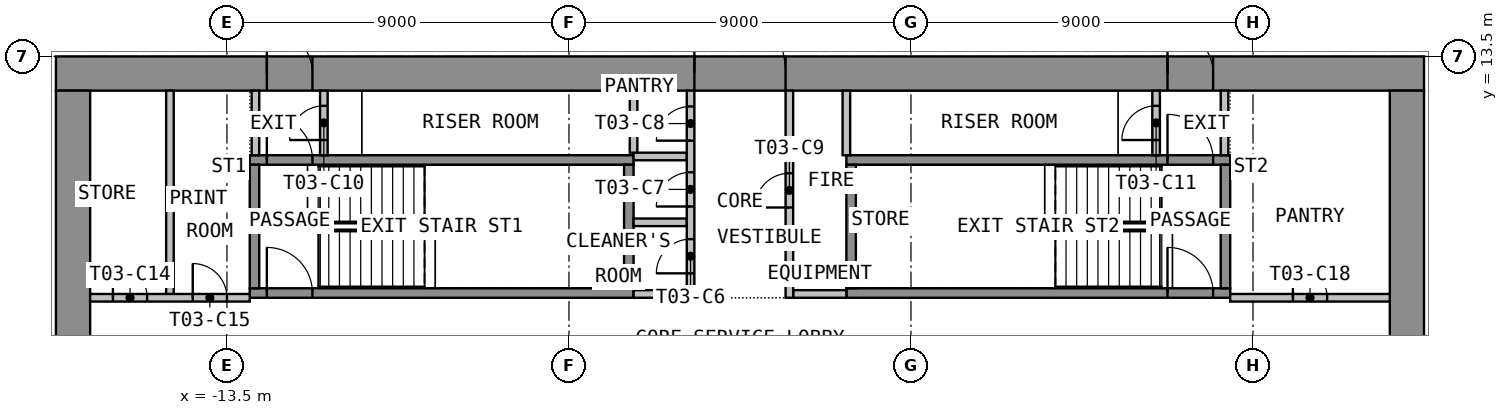
"""IFC4 building model, lengths in metres.
Left out: names, types, materials, properties, quantities, classifications, styles, units other than length and angle.
Written with IfcOpenShell. Run it as: python <this file> out.ifc"""

import sys

from ifc_helpers import new_model, si_unit, direction, frame, frame_2d, origin, place, context, subcontext, project, spatial, rectangle, extrude, element, fill, save


model = new_model("IFC4")
c1 = context("Model", 3, precision=1e-05, world=origin(), true_north=direction((0.0, 1.0)))
c2 = subcontext(c1, "Body", "Model", "MODEL_VIEW")
j1 = project(units=[si_unit("LENGTHUNIT", "METRE"), si_unit("PLANEANGLEUNIT", "RADIAN")], contexts=[c1])
p1 = place(None, origin())
s1 = spatial("IfcSite", under=j1, at=p1, CompositionType="ELEMENT")
p2 = place(p1, origin())
s2 = spatial("IfcBuilding", under=s1, at=p2, CompositionType="ELEMENT")
p3 = place(p2, frame((0.0, 0.0, 53.4)))
s3 = spatial("IfcBuildingStorey", under=s2, at=p3, CompositionType="ELEMENT", Elevation=53.4)
p4 = place(p3, frame((-18.0, 13.05, 0.0), z_axis=(0.0, 0.0, 1.0), x_axis=(1.0, 0.0, 0.0)))
e1 = element("IfcWall", 1, at=p4, inside=s3, PredefinedType="SHEAR", context=c2, shape_type="SweptSolid", body=[
    extrude(rectangle(XDim=36.0, YDim=0.9, at=frame_2d((18.0, 0.0))), origin(), (0.0, 0.0, 1.0), 3.525),
])
p5 = place(p4, frame((16.8, 0.0, 0.0)))
e2 = element("IfcOpeningElement", 2, at=p5, cuts=e1, PredefinedType="OPENING", context=c2, shape_type="SweptSolid", body=[
    extrude(rectangle(XDim=2.4, YDim=2.1, at=frame_2d((1.2, 1.05))), frame((0.0, 0.46, 0.0), z_axis=(0.0, -1.0, 0.0), x_axis=(1.0, 0.0, 0.0)), (0.0, 0.0, 1.0), 0.92),
])
p6 = place(p4, frame((5.55, 0.0, 0.0)))
e3 = element("IfcOpeningElement", 3, at=p6, cuts=e1, PredefinedType="OPENING", context=c2, shape_type="SweptSolid", body=[
    extrude(rectangle(XDim=1.2, YDim=2.1, at=frame_2d((0.6, 1.05))), frame((0.0, 0.46, 0.0), z_axis=(0.0, -1.0, 0.0), x_axis=(1.0, 0.0, 0.0)), (0.0, 0.0, 1.0), 0.92),
])
p7 = place(p4, frame((29.25, 0.0, 0.0)))
e4 = element("IfcOpeningElement", 4, at=p7, cuts=e1, PredefinedType="OPENING", context=c2, shape_type="SweptSolid", body=[
    extrude(rectangle(XDim=1.2, YDim=2.1, at=frame_2d((0.6, 1.05))), frame((0.0, 0.46, 0.0), z_axis=(0.0, -1.0, 0.0), x_axis=(1.0, 0.0, 0.0)), (0.0, 0.0, 1.0), 0.92),
])
p8 = place(p3, frame((-17.55, -12.6, 0.0), z_axis=(0.0, 0.0, 1.0), x_axis=(0.0, 1.0, 0.0)))
e5 = element("IfcWall", 5, at=p8, inside=s3, PredefinedType="SHEAR", context=c2, shape_type="SweptSolid", body=[
    extrude(rectangle(XDim=25.2, YDim=0.9, at=frame_2d((12.6, 0.0))), origin(), (0.0, 0.0, 1.0), 3.525),
])
p9 = place(p8, frame((11.4, 0.0, 0.0)))
e6 = element("IfcOpeningElement", 6, at=p9, cuts=e5, PredefinedType="OPENING", context=c2, shape_type="SweptSolid", body=[
    extrude(rectangle(XDim=2.4, YDim=2.1, at=frame_2d((1.2, 1.05))), frame((0.0, 0.46, 0.0), z_axis=(0.0, -1.0, 0.0), x_axis=(1.0, 0.0, 0.0)), (0.0, 0.0, 1.0), 0.92),
])
p10 = place(p3, frame((17.55, -12.6, 0.0), z_axis=(0.0, 0.0, 1.0), x_axis=(0.0, 1.0, 0.0)))
e7 = element("IfcWall", 7, at=p10, inside=s3, PredefinedType="SHEAR", context=c2, shape_type="SweptSolid", body=[
    extrude(rectangle(XDim=25.2, YDim=0.9, at=frame_2d((12.6, 0.0))), origin(), (0.0, 0.0, 1.0), 3.525),
])
p11 = place(p10, frame((11.4, 0.0, 0.0)))
e8 = element("IfcOpeningElement", 8, at=p11, cuts=e7, PredefinedType="OPENING", context=c2, shape_type="SweptSolid", body=[
    extrude(rectangle(XDim=2.4, YDim=2.1, at=frame_2d((1.2, 1.05))), frame((0.0, 0.46, 0.0), z_axis=(0.0, -1.0, 0.0), x_axis=(1.0, 0.0, 0.0)), (0.0, 0.0, 1.0), 0.92),
])
p12 = place(p3, frame((-12.9, 7.275, 0.0), z_axis=(0.0, 0.0, 1.0), x_axis=(1.0, 0.0, 0.0)))
e9 = element("IfcWall", 9, at=p12, inside=s3, PredefinedType="SHEAR", context=c2, shape_type="SweptSolid", body=[
    extrude(rectangle(XDim=10.1, YDim=0.25, at=frame_2d((5.05, 0.0))), origin(), (0.0, 0.0, 1.0), 3.525),
])
p13 = place(p12, frame((0.45, 0.0, 0.0)))
e10 = element("IfcOpeningElement", 10, at=p13, cuts=e9, PredefinedType="OPENING", context=c2, shape_type="SweptSolid", body=[
    extrude(rectangle(XDim=1.2, YDim=2.1, at=frame_2d((0.6, 1.05))), frame((0.0, 0.135, 0.0), z_axis=(0.0, -1.0, 0.0), x_axis=(1.0, 0.0, 0.0)), (0.0, 0.0, 1.0), 0.27),
])
p14 = place(p3, frame((-12.9, 10.775, 0.0), z_axis=(0.0, 0.0, 1.0), x_axis=(1.0, 0.0, 0.0)))
e11 = element("IfcWall", 11, at=p14, inside=s3, PredefinedType="SHEAR", context=c2, shape_type="SweptSolid", body=[
    extrude(rectangle(XDim=10.1, YDim=0.25, at=frame_2d((5.05, 0.0))), origin(), (0.0, 0.0, 1.0), 3.525),
])
p15 = place(p14, frame((0.45, 0.0, 0.0)))
e12 = element("IfcOpeningElement", 12, at=p15, cuts=e11, PredefinedType="OPENING", context=c2, shape_type="SweptSolid", body=[
    extrude(rectangle(XDim=1.2, YDim=2.1, at=frame_2d((0.6, 1.05))), frame((0.0, 0.135, 0.0), z_axis=(0.0, -1.0, 0.0), x_axis=(1.0, 0.0, 0.0)), (0.0, 0.0, 1.0), 0.27),
])
for number, where, z_axis, x_axis in (
    (13, (-12.775, 7.4, 0.0), (0.0, 0.0, 1.0), (0.0, 1.0, 0.0)),
    (14, (-2.925, 7.4, 0.0), (0.0, 0.0, 1.0), (0.0, 1.0, 0.0)),
):
    element("IfcWall", number, at=place(p3, frame(where, z_axis=z_axis, x_axis=x_axis)), inside=s3, PredefinedType="SHEAR", context=c2, shape_type="SweptSolid", body=[
        extrude(rectangle(XDim=3.25, YDim=0.25, at=frame_2d((1.625, 0.0))), origin(), (0.0, 0.0, 1.0), 3.525),
    ])
p16 = place(p3, frame((2.8, 7.275, 0.0), z_axis=(0.0, 0.0, 1.0), x_axis=(1.0, 0.0, 0.0)))
e15 = element("IfcWall", 15, at=p16, inside=s3, PredefinedType="SHEAR", context=c2, shape_type="SweptSolid", body=[
    extrude(rectangle(XDim=10.1, YDim=0.25, at=frame_2d((5.05, 0.0))), origin(), (0.0, 0.0, 1.0), 3.525),
])
p17 = place(p16, frame((8.45, 0.0, 0.0)))
e16 = element("IfcOpeningElement", 16, at=p17, cuts=e15, PredefinedType="OPENING", context=c2, shape_type="SweptSolid", body=[
    extrude(rectangle(XDim=1.2, YDim=2.1, at=frame_2d((0.6, 1.05))), frame((0.0, 0.135, 0.0), z_axis=(0.0, -1.0, 0.0), x_axis=(1.0, 0.0, 0.0)), (0.0, 0.0, 1.0), 0.27),
])
p18 = place(p3, frame((2.8, 10.775, 0.0), z_axis=(0.0, 0.0, 1.0), x_axis=(1.0, 0.0, 0.0)))
e17 = element("IfcWall", 17, at=p18, inside=s3, PredefinedType="SHEAR", context=c2, shape_type="SweptSolid", body=[
    extrude(rectangle(XDim=10.1, YDim=0.25, at=frame_2d((5.05, 0.0))), origin(), (0.0, 0.0, 1.0), 3.525),
])
p19 = place(p18, frame((8.45, 0.0, 0.0)))
e18 = element("IfcOpeningElement", 18, at=p19, cuts=e17, PredefinedType="OPENING", context=c2, shape_type="SweptSolid", body=[
    extrude(rectangle(XDim=1.2, YDim=2.1, at=frame_2d((0.6, 1.05))), frame((0.0, 0.135, 0.0), z_axis=(0.0, -1.0, 0.0), x_axis=(1.0, 0.0, 0.0)), (0.0, 0.0, 1.0), 0.27),
])
for number, where, z_axis, x_axis in (
    (19, (2.925, 7.4, 0.0), (0.0, 0.0, 1.0), (0.0, 1.0, 0.0)),
    (20, (12.775, 7.4, 0.0), (0.0, 0.0, 1.0), (0.0, 1.0, 0.0)),
):
    element("IfcWall", number, at=place(p3, frame(where, z_axis=z_axis, x_axis=x_axis)), inside=s3, PredefinedType="SHEAR", context=c2, shape_type="SweptSolid", body=[
        extrude(rectangle(XDim=3.25, YDim=0.25, at=frame_2d((1.625, 0.0))), origin(), (0.0, 0.0, 1.0), 3.525),
    ])
for number, where, z_axis, x_axis in (
    (21, (-2.8, 7.25, 0.0), (0.0, 0.0, 1.0), (1.0, 0.0, 0.0)),
    (22, (-2.8, 9.135, 0.0), (0.0, 0.0, 1.0), (1.0, 0.0, 0.0)),
    (23, (-2.8, 10.867, 0.0), (0.0, 0.0, 1.0), (1.0, 0.0, 0.0)),
    (24, (1.4, 7.25, 0.0), (0.0, 0.0, 1.0), (1.0, 0.0, 0.0)),
):
    element("IfcWall", number, at=place(p3, frame(where, z_axis=z_axis, x_axis=x_axis)), inside=s3, PredefinedType="PARTITIONING", context=c2, shape_type="SweptSolid", body=[
        extrude(rectangle(XDim=1.4, YDim=0.2, at=frame_2d((0.7, 0.0))), origin(), (0.0, 0.0, 1.0), 3.525),
    ])
p20 = place(p3, frame((-1.3, 7.15, 0.0), z_axis=(0.0, 0.0, 1.0), x_axis=(0.0, 1.0, 0.0)))
e25 = element("IfcWall", 25, at=p20, inside=s3, PredefinedType="PARTITIONING", context=c2, shape_type="SweptSolid", body=[
    extrude(rectangle(XDim=5.45, YDim=0.2, at=frame_2d((2.725, 0.0))), origin(), (0.0, 0.0, 1.0), 3.525),
])
p21 = place(p20, frame((0.643, 0.0, 0.0)))
e26 = element("IfcOpeningElement", 26, at=p21, cuts=e25, PredefinedType="OPENING", context=c2, shape_type="SweptSolid", body=[
    extrude(rectangle(XDim=0.9, YDim=2.1, at=frame_2d((0.45, 1.05))), frame((0.0, 0.11, 0.0), z_axis=(0.0, -1.0, 0.0), x_axis=(1.0, 0.0, 0.0)), (0.0, 0.0, 1.0), 0.22),
])
p22 = place(p20, frame((2.401, 0.0, 0.0)))
e27 = element("IfcOpeningElement", 27, at=p22, cuts=e25, PredefinedType="OPENING", context=c2, shape_type="SweptSolid", body=[
    extrude(rectangle(XDim=0.9, YDim=2.1, at=frame_2d((0.45, 1.05))), frame((0.0, 0.11, 0.0), z_axis=(0.0, -1.0, 0.0), x_axis=(1.0, 0.0, 0.0)), (0.0, 0.0, 1.0), 0.22),
])
p23 = place(p20, frame((4.134, 0.0, 0.0)))
e28 = element("IfcOpeningElement", 28, at=p23, cuts=e25, PredefinedType="OPENING", context=c2, shape_type="SweptSolid", body=[
    extrude(rectangle(XDim=0.9, YDim=2.1, at=frame_2d((0.45, 1.05))), frame((0.0, 0.11, 0.0), z_axis=(0.0, -1.0, 0.0), x_axis=(1.0, 0.0, 0.0)), (0.0, 0.0, 1.0), 0.22),
])
p24 = place(p3, frame((1.3, 7.15, 0.0), z_axis=(0.0, 0.0, 1.0), x_axis=(0.0, 1.0, 0.0)))
e29 = element("IfcWall", 29, at=p24, inside=s3, PredefinedType="PARTITIONING", context=c2, shape_type="SweptSolid", body=[
    extrude(rectangle(XDim=5.45, YDim=0.2, at=frame_2d((2.725, 0.0))), origin(), (0.0, 0.0, 1.0), 3.525),
])
p25 = place(p24, frame((2.375, 0.0, 0.0)))
e30 = element("IfcOpeningElement", 30, at=p25, cuts=e29, PredefinedType="OPENING", context=c2, shape_type="SweptSolid", body=[
    extrude(rectangle(XDim=0.9, YDim=2.1, at=frame_2d((0.45, 1.05))), frame((0.0, 0.11, 0.0), z_axis=(0.0, -1.0, 0.0), x_axis=(1.0, 0.0, 0.0)), (0.0, 0.0, 1.0), 0.22),
])
p26 = place(p3, frame((-12.75, 10.9, 0.0), z_axis=(0.0, 0.0, 1.0), x_axis=(0.0, 1.0, 0.0)))
e31 = element("IfcWall", 31, at=p26, inside=s3, PredefinedType="PARTITIONING", context=c2, shape_type="SweptSolid", body=[
    extrude(rectangle(XDim=1.7, YDim=0.2, at=frame_2d((0.85, 0.0))), origin(), (0.0, 0.0, 1.0), 3.525),
])
p27 = place(p3, frame((-10.95, 10.9, 0.0), z_axis=(0.0, 0.0, 1.0), x_axis=(0.0, 1.0, 0.0)))
e32 = element("IfcWall", 32, at=p27, inside=s3, PredefinedType="PARTITIONING", context=c2, shape_type="SweptSolid", body=[
    extrude(rectangle(XDim=1.7, YDim=0.2, at=frame_2d((0.85, 0.0))), origin(), (0.0, 0.0, 1.0), 3.525),
])
p28 = place(p27, frame((0.4, 0.0, 0.0)))
e33 = element("IfcOpeningElement", 33, at=p28, cuts=e32, PredefinedType="OPENING", context=c2, shape_type="SweptSolid", body=[
    extrude(rectangle(XDim=0.9, YDim=2.1, at=frame_2d((0.45, 1.05))), frame((0.0, 0.11, 0.0), z_axis=(0.0, -1.0, 0.0), x_axis=(1.0, 0.0, 0.0)), (0.0, 0.0, 1.0), 0.22),
])
p29 = place(p3, frame((12.75, 10.9, 0.0), z_axis=(0.0, 0.0, 1.0), x_axis=(0.0, 1.0, 0.0)))
e34 = element("IfcWall", 34, at=p29, inside=s3, PredefinedType="PARTITIONING", context=c2, shape_type="SweptSolid", body=[
    extrude(rectangle(XDim=1.7, YDim=0.2, at=frame_2d((0.85, 0.0))), origin(), (0.0, 0.0, 1.0), 3.525),
])
p30 = place(p3, frame((10.95, 10.9, 0.0), z_axis=(0.0, 0.0, 1.0), x_axis=(0.0, 1.0, 0.0)))
e35 = element("IfcWall", 35, at=p30, inside=s3, PredefinedType="PARTITIONING", context=c2, shape_type="SweptSolid", body=[
    extrude(rectangle(XDim=1.7, YDim=0.2, at=frame_2d((0.85, 0.0))), origin(), (0.0, 0.0, 1.0), 3.525),
])
p31 = place(p30, frame((0.4, 0.0, 0.0)))
e36 = element("IfcOpeningElement", 36, at=p31, cuts=e35, PredefinedType="OPENING", context=c2, shape_type="SweptSolid", body=[
    extrude(rectangle(XDim=0.9, YDim=2.1, at=frame_2d((0.45, 1.05))), frame((0.0, 0.11, 0.0), z_axis=(0.0, -1.0, 0.0), x_axis=(1.0, 0.0, 0.0)), (0.0, 0.0, 1.0), 0.22),
])
p32 = place(p3, frame((-15.0, 7.15, 0.0), z_axis=(0.0, 0.0, 1.0), x_axis=(0.0, 1.0, 0.0)))
e37 = element("IfcWall", 37, at=p32, inside=s3, PredefinedType="PARTITIONING", context=c2, shape_type="SweptSolid", body=[
    extrude(rectangle(XDim=5.45, YDim=0.2, at=frame_2d((2.725, 0.0))), origin(), (0.0, 0.0, 1.0), 3.525),
])
p33 = place(p3, frame((-17.1, 7.15, 0.0), z_axis=(0.0, 0.0, 1.0), x_axis=(1.0, 0.0, 0.0)))
e38 = element("IfcWall", 38, at=p33, inside=s3, PredefinedType="PARTITIONING", context=c2, shape_type="SweptSolid", body=[
    extrude(rectangle(XDim=4.2, YDim=0.2, at=frame_2d((2.1, 0.0))), origin(), (0.0, 0.0, 1.0), 3.525),
])
p34 = place(p33, frame((0.6, 0.0, 0.0)))
e39 = element("IfcOpeningElement", 39, at=p34, cuts=e38, PredefinedType="OPENING", context=c2, shape_type="SweptSolid", body=[
    extrude(rectangle(XDim=0.9, YDim=2.1, at=frame_2d((0.45, 1.05))), frame((0.0, 0.11, 0.0), z_axis=(0.0, -1.0, 0.0), x_axis=(1.0, 0.0, 0.0)), (0.0, 0.0, 1.0), 0.22),
])
p35 = place(p33, frame((2.7, 0.0, 0.0)))
e40 = element("IfcOpeningElement", 40, at=p35, cuts=e38, PredefinedType="OPENING", context=c2, shape_type="SweptSolid", body=[
    extrude(rectangle(XDim=0.9, YDim=2.1, at=frame_2d((0.45, 1.05))), frame((0.0, 0.11, 0.0), z_axis=(0.0, -1.0, 0.0), x_axis=(1.0, 0.0, 0.0)), (0.0, 0.0, 1.0), 0.22),
])
p36 = place(p3, frame((12.9, 7.15, 0.0), z_axis=(0.0, 0.0, 1.0), x_axis=(1.0, 0.0, 0.0)))
e41 = element("IfcWall", 41, at=p36, inside=s3, PredefinedType="PARTITIONING", context=c2, shape_type="SweptSolid", body=[
    extrude(rectangle(XDim=4.2, YDim=0.2, at=frame_2d((2.1, 0.0))), origin(), (0.0, 0.0, 1.0), 3.525),
])
p37 = place(p36, frame((1.65, 0.0, 0.0)))
e42 = element("IfcOpeningElement", 42, at=p37, cuts=e41, PredefinedType="OPENING", context=c2, shape_type="SweptSolid", body=[
    extrude(rectangle(XDim=0.9, YDim=2.1, at=frame_2d((0.45, 1.05))), frame((0.0, 0.11, 0.0), z_axis=(0.0, -1.0, 0.0), x_axis=(1.0, 0.0, 0.0)), (0.0, 0.0, 1.0), 0.22),
])
p38 = place(p3, frame((-2.8, 10.969, 0.0), z_axis=(0.0, 0.0, 1.0), x_axis=(0.0, 1.0, 0.0)))
e43 = element("IfcWall", 43, at=p38, inside=s3, PredefinedType="PARTITIONING", context=c2, shape_type="SweptSolid", body=[
    extrude(rectangle(XDim=1.631, YDim=0.2, at=frame_2d((0.815, 0.0))), origin(), (0.0, 0.0, 1.0), 3.525),
])
p39 = place(p3, frame((2.8, 12.599, 0.0), z_axis=(0.0, 0.0, 1.0), x_axis=(0.0, -1.0, 0.0)))
e44 = element("IfcWall", 44, at=p39, inside=s3, PredefinedType="PARTITIONING", context=c2, shape_type="SweptSolid", body=[
    extrude(rectangle(XDim=1.698, YDim=0.2, at=frame_2d((0.849, 0.0))), origin(), (0.0, 0.0, 1.0), 3.525),
])
p40 = place(p5, origin())
e45 = element("IfcDoor", 45, at=p40, inside=s3, OperationType="DOUBLE_DOOR_DOUBLE_SWING", PredefinedType="DOOR", context=c2, shape_type="SweptSolid", body=[
    extrude(rectangle(XDim=2.4, YDim=2.1, at=frame_2d((1.2, 1.05))), frame((0.0, 0.025, 0.0), z_axis=(0.0, -1.0, 0.0), x_axis=(1.0, 0.0, 0.0)), (0.0, 0.0, 1.0), 0.05),
])
fill(e2, e45)
p41 = place(p6, origin())
e46 = element("IfcDoor", 46, at=p41, inside=s3, OperationType="SINGLE_SWING_RIGHT", PredefinedType="DOOR", context=c2, shape_type="SweptSolid", body=[
    extrude(rectangle(XDim=1.2, YDim=2.1, at=frame_2d((0.6, 1.05))), frame((0.0, 0.025, 0.0), z_axis=(0.0, -1.0, 0.0), x_axis=(1.0, 0.0, 0.0)), (0.0, 0.0, 1.0), 0.05),
])
fill(e3, e46)
p42 = place(p7, origin())
e47 = element("IfcDoor", 47, at=p42, inside=s3, OperationType="SINGLE_SWING_RIGHT", PredefinedType="DOOR", context=c2, shape_type="SweptSolid", body=[
    extrude(rectangle(XDim=1.2, YDim=2.1, at=frame_2d((0.6, 1.05))), frame((0.0, 0.025, 0.0), z_axis=(0.0, -1.0, 0.0), x_axis=(1.0, 0.0, 0.0)), (0.0, 0.0, 1.0), 0.05),
])
fill(e4, e47)
p43 = place(p13, origin())
e48 = element("IfcDoor", 48, at=p43, inside=s3, OperationType="SINGLE_SWING_LEFT", PredefinedType="DOOR", context=c2, shape_type="SweptSolid", body=[
    extrude(rectangle(XDim=1.2, YDim=2.1, at=frame_2d((0.6, 1.05))), frame((0.0, 0.025, 0.0), z_axis=(0.0, -1.0, 0.0), x_axis=(1.0, 0.0, 0.0)), (0.0, 0.0, 1.0), 0.05),
])
fill(e10, e48)
p44 = place(p17, origin())
e49 = element("IfcDoor", 49, at=p44, inside=s3, OperationType="SINGLE_SWING_LEFT", PredefinedType="DOOR", context=c2, shape_type="SweptSolid", body=[
    extrude(rectangle(XDim=1.2, YDim=2.1, at=frame_2d((0.6, 1.05))), frame((0.0, 0.025, 0.0), z_axis=(0.0, -1.0, 0.0), x_axis=(1.0, 0.0, 0.0)), (0.0, 0.0, 1.0), 0.05),
])
fill(e16, e49)
p45 = place(p21, origin())
e50 = element("IfcDoor", 50, at=p45, inside=s3, OperationType="SINGLE_SWING_LEFT", PredefinedType="DOOR", context=c2, shape_type="SweptSolid", body=[
    extrude(rectangle(XDim=0.9, YDim=2.1, at=frame_2d((0.45, 1.05))), frame((0.0, 0.025, 0.0), z_axis=(0.0, -1.0, 0.0), x_axis=(1.0, 0.0, 0.0)), (0.0, 0.0, 1.0), 0.05),
])
fill(e26, e50)
p46 = place(p22, origin())
e51 = element("IfcDoor", 51, at=p46, inside=s3, OperationType="SINGLE_SWING_LEFT", PredefinedType="DOOR", context=c2, shape_type="SweptSolid", body=[
    extrude(rectangle(XDim=0.9, YDim=2.1, at=frame_2d((0.45, 1.05))), frame((0.0, 0.025, 0.0), z_axis=(0.0, -1.0, 0.0), x_axis=(1.0, 0.0, 0.0)), (0.0, 0.0, 1.0), 0.05),
])
fill(e27, e51)
p47 = place(p23, origin())
e52 = element("IfcDoor", 52, at=p47, inside=s3, OperationType="SINGLE_SWING_LEFT", PredefinedType="DOOR", context=c2, shape_type="SweptSolid", body=[
    extrude(rectangle(XDim=0.9, YDim=2.1, at=frame_2d((0.45, 1.05))), frame((0.0, 0.025, 0.0), z_axis=(0.0, -1.0, 0.0), x_axis=(1.0, 0.0, 0.0)), (0.0, 0.0, 1.0), 0.05),
])
fill(e28, e52)
p48 = place(p25, origin())
e53 = element("IfcDoor", 53, at=p48, inside=s3, OperationType="SINGLE_SWING_LEFT", PredefinedType="DOOR", context=c2, shape_type="SweptSolid", body=[
    extrude(rectangle(XDim=0.9, YDim=2.1, at=frame_2d((0.45, 1.05))), frame((0.0, 0.025, 0.0), z_axis=(0.0, -1.0, 0.0), x_axis=(1.0, 0.0, 0.0)), (0.0, 0.0, 1.0), 0.05),
])
fill(e30, e53)
p49 = place(p15, origin())
e54 = element("IfcDoor", 54, at=p49, inside=s3, OperationType="SINGLE_SWING_RIGHT", PredefinedType="DOOR", context=c2, shape_type="SweptSolid", body=[
    extrude(rectangle(XDim=1.2, YDim=2.1, at=frame_2d((0.6, 1.05))), frame((0.0, 0.025, 0.0), z_axis=(0.0, -1.0, 0.0), x_axis=(1.0, 0.0, 0.0)), (0.0, 0.0, 1.0), 0.05),
])
fill(e12, e54)
p50 = place(p28, origin())
e55 = element("IfcDoor", 55, at=p50, inside=s3, OperationType="SINGLE_SWING_LEFT", PredefinedType="DOOR", context=c2, shape_type="SweptSolid", body=[
    extrude(rectangle(XDim=0.9, YDim=2.1, at=frame_2d((0.45, 1.05))), frame((0.0, 0.025, 0.0), z_axis=(0.0, -1.0, 0.0), x_axis=(1.0, 0.0, 0.0)), (0.0, 0.0, 1.0), 0.05),
])
fill(e33, e55)
p51 = place(p19, origin())
e56 = element("IfcDoor", 56, at=p51, inside=s3, OperationType="SINGLE_SWING_RIGHT", PredefinedType="DOOR", context=c2, shape_type="SweptSolid", body=[
    extrude(rectangle(XDim=1.2, YDim=2.1, at=frame_2d((0.6, 1.05))), frame((0.0, 0.025, 0.0), z_axis=(0.0, -1.0, 0.0), x_axis=(1.0, 0.0, 0.0)), (0.0, 0.0, 1.0), 0.05),
])
fill(e18, e56)
p52 = place(p31, origin())
e57 = element("IfcDoor", 57, at=p52, inside=s3, OperationType="SINGLE_SWING_LEFT", PredefinedType="DOOR", context=c2, shape_type="SweptSolid", body=[
    extrude(rectangle(XDim=0.9, YDim=2.1, at=frame_2d((0.45, 1.05))), frame((0.0, 0.025, 0.0), z_axis=(0.0, -1.0, 0.0), x_axis=(1.0, 0.0, 0.0)), (0.0, 0.0, 1.0), 0.05),
])
fill(e36, e57)
p53 = place(p34, origin())
e58 = element("IfcDoor", 58, at=p53, inside=s3, OperationType="SINGLE_SWING_LEFT", PredefinedType="DOOR", context=c2, shape_type="SweptSolid", body=[
    extrude(rectangle(XDim=0.9, YDim=2.1, at=frame_2d((0.45, 1.05))), frame((0.0, 0.025, 0.0), z_axis=(0.0, -1.0, 0.0), x_axis=(1.0, 0.0, 0.0)), (0.0, 0.0, 1.0), 0.05),
])
fill(e39, e58)
p54 = place(p35, origin())
e59 = element("IfcDoor", 59, at=p54, inside=s3, OperationType="SINGLE_SWING_LEFT", PredefinedType="DOOR", context=c2, shape_type="SweptSolid", body=[
    extrude(rectangle(XDim=0.9, YDim=2.1, at=frame_2d((0.45, 1.05))), frame((0.0, 0.025, 0.0), z_axis=(0.0, -1.0, 0.0), x_axis=(1.0, 0.0, 0.0)), (0.0, 0.0, 1.0), 0.05),
])
fill(e40, e59)
p55 = place(p37, origin())
e60 = element("IfcDoor", 60, at=p55, inside=s3, OperationType="SINGLE_SWING_LEFT", PredefinedType="DOOR", context=c2, shape_type="SweptSolid", body=[
    extrude(rectangle(XDim=0.9, YDim=2.1, at=frame_2d((0.45, 1.05))), frame((0.0, 0.025, 0.0), z_axis=(0.0, -1.0, 0.0), x_axis=(1.0, 0.0, 0.0)), (0.0, 0.0, 1.0), 0.05),
])
fill(e42, e60)
save(model, sys.argv[1])
